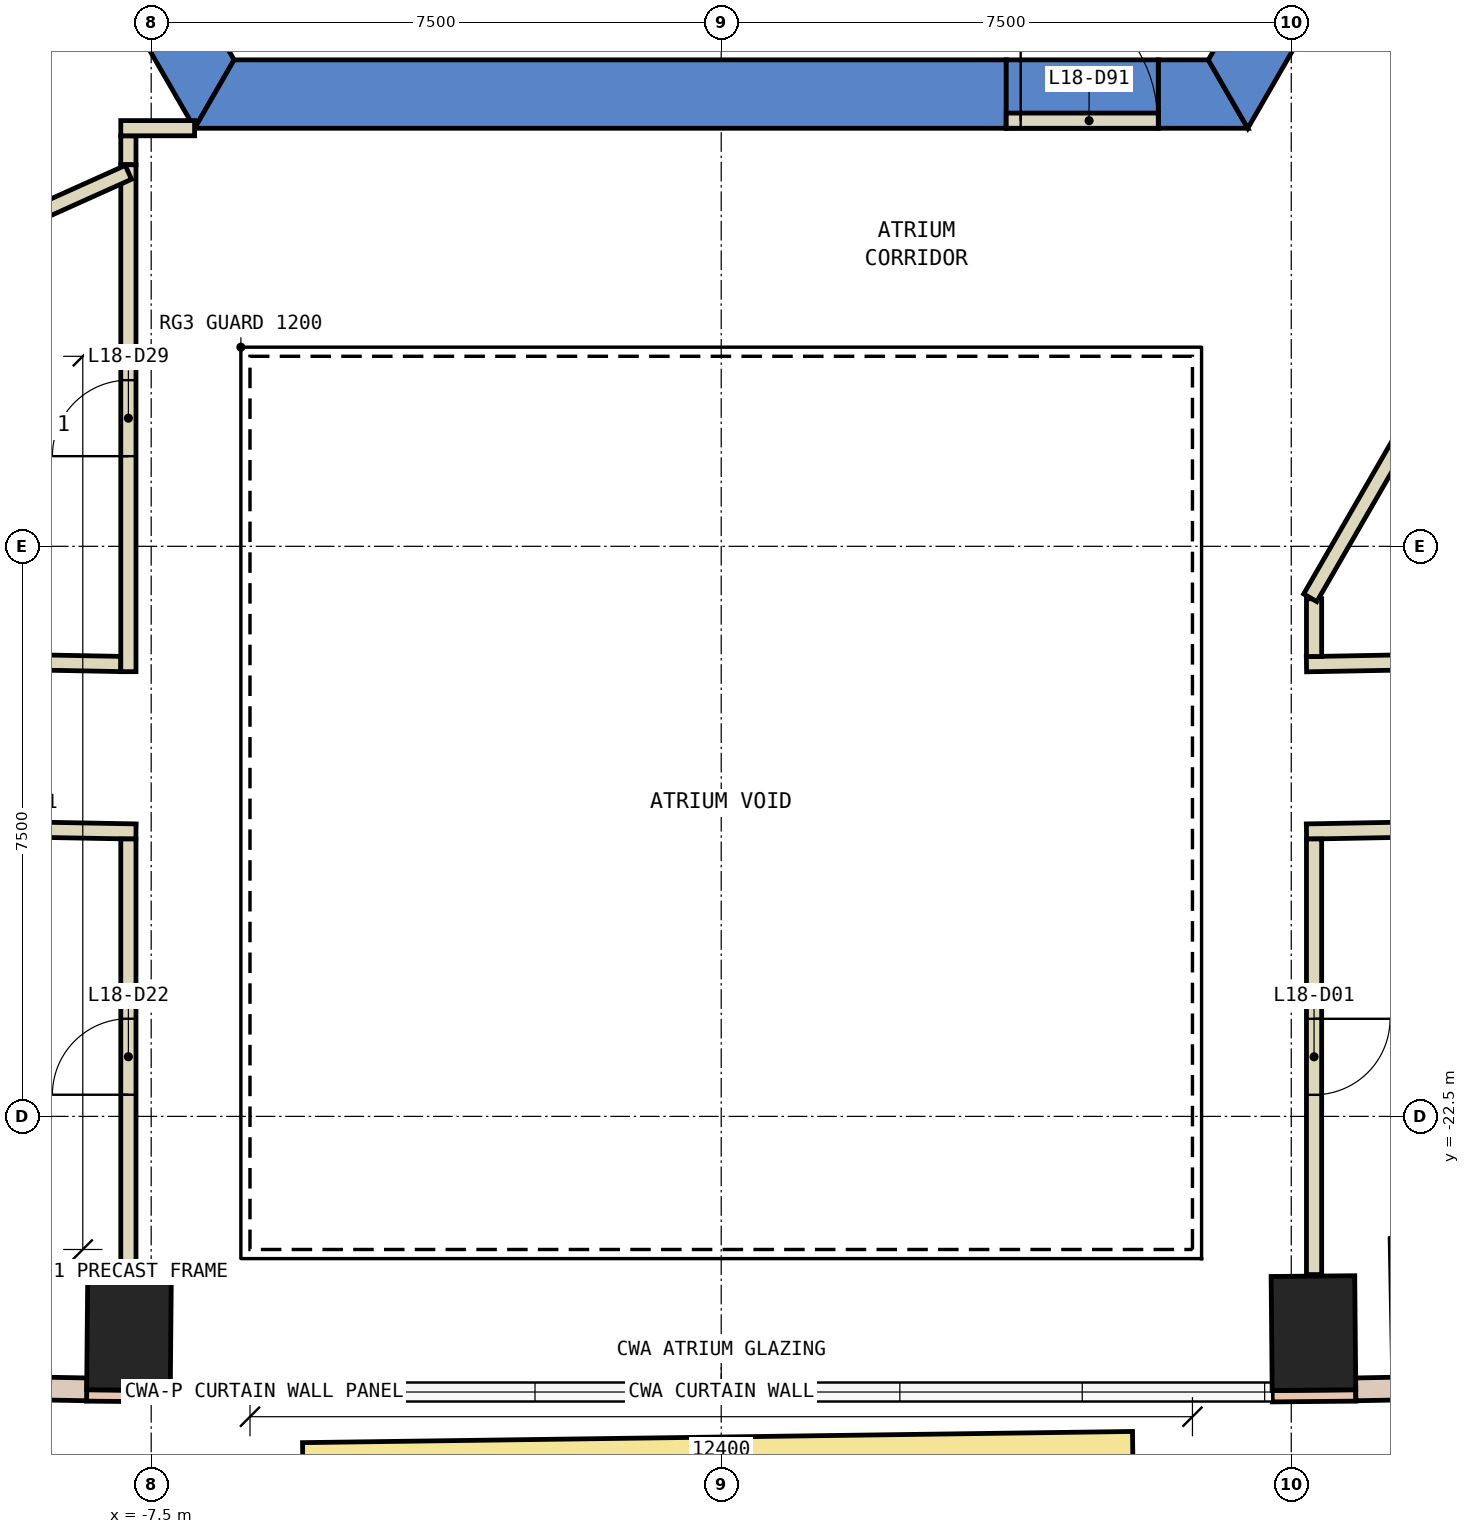
"""IFC4 building model, lengths in metres.
Left out: names, types, materials, properties, quantities, classifications, styles, units other than length and angle.
Written with IfcOpenShell. Run it as: python <this file> out.ifc"""

import sys

from ifc_helpers import new_model, si_unit, direction, frame, frame_2d, origin, origin_2d, place, context, subcontext, project, spatial, polyline, rectangle, outline, extrude, element, fill, save


model = new_model("IFC4")
c1 = context("Model", 3, precision=1e-05, world=origin(), true_north=direction((0.0, 1.0)))
c2 = subcontext(c1, "Body", "Model", "MODEL_VIEW")
j1 = project(units=[si_unit("LENGTHUNIT", "METRE"), si_unit("PLANEANGLEUNIT", "RADIAN")], contexts=[c1])
p1 = place(None, origin())
s1 = spatial("IfcSite", under=j1, at=p1, CompositionType="ELEMENT")
p2 = place(p1, origin())
s2 = spatial("IfcBuilding", under=s1, at=p2, CompositionType="ELEMENT")
p3 = place(p2, frame((0.0, 0.0, 86.6)))
s3 = spatial("IfcBuildingStorey", under=s2, at=p3, CompositionType="ELEMENT", Elevation=86.6)
for number, where, z_axis, x_axis in (
    (1, (-7.792, -25.351, 0.0), (0.0, 0.0, 1.0), (-1.0, 0.009, 0.0)),
    (2, (7.792, -25.351, 0.0), (0.0, 0.0, 1.0), (1.0, 0.009, 0.0)),
):
    element("IfcColumn", number, at=place(p3, frame(where, z_axis=z_axis, x_axis=x_axis)), inside=s3, PredefinedType="COLUMN", context=c2, shape_type="SweptSolid", body=[
        extrude(rectangle(XDim=1.1, YDim=1.5, at=origin_2d()), origin(), (0.0, 0.0, 1.0), 3.8),
    ])
p4 = place(p3, frame((0.0, 0.0, -0.6)))
e3 = element("IfcWall", 3, at=p4, inside=s3, PredefinedType="SHEAR", context=c2, shape_type="SweptSolid", body=[
    extrude(outline(polyline([(-13.856, 2.5), (-6.928, -9.5), (-6.409, -8.6), (-12.817, 2.5), (-13.856, 2.5)])), origin(), (0.0, 0.0, 1.0), 4.4),
])
p5 = place(p3, frame((0.0, 0.0, -0.6)))
e4 = element("IfcWall", 4, at=p5, inside=s3, PredefinedType="SHEAR", context=c2, shape_type="SweptSolid", body=[
    extrude(outline(polyline([(3.75, -9.5), (3.75, -8.6), (-6.409, -8.6), (-6.928, -9.5), (3.75, -9.5)])), origin(), (0.0, 0.0, 1.0), 4.4),
])
p6 = place(p3, frame((0.0, 0.0, -0.6)))
e5 = element("IfcWall", 5, at=p6, inside=s3, PredefinedType="SHEAR", context=c2, shape_type="SweptSolid", body=[
    extrude(outline(polyline([(5.75, -8.6), (5.75, -9.5), (6.928, -9.5), (6.409, -8.6), (5.75, -8.6)])), origin(), (0.0, 0.0, 1.0), 4.4),
])
p7 = place(p3, frame((0.0, 0.0, 3.6)))
e6 = element("IfcWall", 6, at=p7, inside=s3, PredefinedType="SHEAR", context=c2, shape_type="SweptSolid", body=[
    extrude(outline(polyline([(5.75, -9.5), (5.75, -8.6), (3.75, -8.6), (3.75, -9.5), (5.75, -9.5)])), origin(), (0.0, 0.0, 1.0), 0.2),
])
p8 = place(p3, frame((0.0, 0.0, -0.6)))
e7 = element("IfcWall", 7, at=p8, inside=s3, PredefinedType="SHEAR", context=c2, shape_type="SweptSolid", body=[
    extrude(outline(polyline([(8.117, -7.44), (7.338, -6.99), (6.409, -8.6), (6.928, -9.5), (8.117, -7.44)])), origin(), (0.0, 0.0, 1.0), 4.4),
])
for number, where, z_axis, x_axis in (
    (8, (-8.349, -26.171, 0.0), (0.0, 0.0, 1.0), (1.0, -0.009, 0.0)),
    (9, (7.249, -26.181, 0.0), (0.0, 0.0, 1.0), (1.0, 0.009, 0.0)),
):
    element("IfcWall", number, at=place(p3, frame(where, z_axis=z_axis, x_axis=x_axis)), inside=s3, PredefinedType="STANDARD", context=c2, shape_type="SweptSolid", body=[
        extrude(rectangle(XDim=1.1, YDim=0.15, at=frame_2d((0.55, 0.0))), origin(), (0.0, 0.0, 1.0), 3.8),
    ])
p9 = place(p3, frame((-14.242, -25.982, 0.0), z_axis=(0.0, 0.0, 1.0), x_axis=(0.999828633111, -0.018512277318, 0.0)))
e10 = element("IfcWall", 10, at=p9, inside=s3, PredefinedType="STANDARD", context=c2, shape_type="SweptSolid", body=[
    extrude(rectangle(XDim=5.895, YDim=0.3, at=frame_2d((2.948, 0.0))), origin(), (0.0, 0.0, 1.0), 3.8),
])
p10 = place(p9, frame((0.474, 0.0, 0.9)))
e11 = element("IfcOpeningElement", 11, at=p10, cuts=e10, PredefinedType="OPENING", context=c2, shape_type="SweptSolid", body=[
    extrude(rectangle(XDim=2.0, YDim=2.6, at=frame_2d((1.0, 1.3))), frame((0.0, 0.16, 0.0), z_axis=(0.0, -1.0, 0.0), x_axis=(1.0, 0.0, 0.0)), (0.0, 0.0, 1.0), 0.32),
])
p11 = place(p9, frame((3.421, 0.0, 0.9)))
e12 = element("IfcOpeningElement", 12, at=p11, cuts=e10, PredefinedType="OPENING", context=c2, shape_type="SweptSolid", body=[
    extrude(rectangle(XDim=2.0, YDim=2.6, at=frame_2d((1.0, 1.3))), frame((0.0, 0.16, 0.0), z_axis=(0.0, -1.0, 0.0), x_axis=(1.0, 0.0, 0.0)), (0.0, 0.0, 1.0), 0.32),
])
p12 = place(p3, frame((8.348, -26.091, 0.0), z_axis=(0.0, 0.0, 1.0), x_axis=(0.999828633111, 0.018512277318, 0.0)))
e13 = element("IfcWall", 13, at=p12, inside=s3, PredefinedType="STANDARD", context=c2, shape_type="SweptSolid", body=[
    extrude(rectangle(XDim=5.895, YDim=0.3, at=frame_2d((2.948, 0.0))), origin(), (0.0, 0.0, 1.0), 3.8),
])
p13 = place(p12, frame((0.474, 0.0, 0.0)))
e14 = element("IfcOpeningElement", 14, at=p13, cuts=e13, PredefinedType="OPENING", context=c2, shape_type="SweptSolid", body=[
    extrude(rectangle(XDim=2.0, YDim=2.4, at=frame_2d((1.0, 1.2))), frame((0.0, 0.16, 0.0), z_axis=(0.0, -1.0, 0.0), x_axis=(1.0, 0.0, 0.0)), (0.0, 0.0, 1.0), 0.32),
])
p14 = place(p12, frame((3.421, 0.0, 0.9)))
e15 = element("IfcOpeningElement", 15, at=p14, cuts=e13, PredefinedType="OPENING", context=c2, shape_type="SweptSolid", body=[
    extrude(rectangle(XDim=2.0, YDim=2.6, at=frame_2d((1.0, 1.3))), frame((0.0, 0.16, 0.0), z_axis=(0.0, -1.0, 0.0), x_axis=(1.0, 0.0, 0.0)), (0.0, 0.0, 1.0), 0.32),
])
p15 = place(p3, frame((-5.496, -27.742, 0.0), z_axis=(0.0, 0.0, 1.0), x_axis=(0.999909442252, 0.013457611041, 0.0)))
e16 = element("IfcWall", 16, at=p15, inside=s3, PredefinedType="STANDARD", context=c2, shape_type="SweptSolid", body=[
    extrude(rectangle(XDim=10.921, YDim=1.9, at=frame_2d((5.46, 0.0))), origin(), (0.0, 0.0, 1.0), 0.8),
])
p16 = place(p3, frame((7.7, -16.551, 0.0), z_axis=(0.0, 0.0, 1.0), x_axis=(0.999831478914, 0.018357934851, 0.0)))
e17 = element("IfcWall", 17, at=p16, inside=s3, PredefinedType="PARTITIONING", context=c2, shape_type="SweptSolid", body=[
    extrude(rectangle(XDim=6.862, YDim=0.2, at=frame_2d((3.431, 0.0))), origin(), (0.0, 0.0, 1.0), 3.8),
])
p17 = place(p3, frame((-10.408, -16.501, 0.0), z_axis=(0.0, 0.0, 1.0), x_axis=(0.999823568917, -0.018783797216, 0.0)))
e18 = element("IfcWall", 18, at=p17, inside=s3, PredefinedType="PARTITIONING", context=c2, shape_type="SweptSolid", body=[
    extrude(rectangle(XDim=2.509, YDim=0.2, at=frame_2d((1.254, 0.0))), origin(), (0.0, 0.0, 1.0), 3.8),
])
p18 = place(p3, frame((14.689, -18.623, 0.0), z_axis=(0.0, 0.0, 1.0), x_axis=(-0.99982995049, -0.01844098976, 0.0)))
e19 = element("IfcWall", 19, at=p18, inside=s3, PredefinedType="PARTITIONING", context=c2, shape_type="SweptSolid", body=[
    extrude(rectangle(XDim=6.99, YDim=0.2, at=frame_2d((3.495, 0.0))), origin(), (0.0, 0.0, 1.0), 3.8),
])
p19 = place(p3, frame((-7.7, -18.752, 0.0), z_axis=(0.0, 0.0, 1.0), x_axis=(-0.999830394604, 0.018416895142, 0.0)))
e20 = element("IfcWall", 20, at=p19, inside=s3, PredefinedType="PARTITIONING", context=c2, shape_type="SweptSolid", body=[
    extrude(rectangle(XDim=6.84, YDim=0.2, at=frame_2d((3.42, 0.0))), origin(), (0.0, 0.0, 1.0), 3.8),
])
p20 = place(p3, frame((7.8, -15.69, 0.0), z_axis=(0.0, 0.0, 1.0), x_axis=(0.0, -1.0, 0.0)))
e21 = element("IfcWall", 21, at=p20, inside=s3, PredefinedType="PARTITIONING", context=c2, shape_type="SweptSolid", body=[
    extrude(rectangle(XDim=0.759, YDim=0.2, at=frame_2d((0.379, 0.0))), origin(), (0.0, 0.0, 1.0), 3.8),
])
p21 = place(p3, frame((-7.8, -9.98, 0.0), z_axis=(0.0, 0.0, 1.0), x_axis=(0.0, 1.0, 0.0)))
e22 = element("IfcWall", 22, at=p21, inside=s3, PredefinedType="PARTITIONING", context=c2, shape_type="SweptSolid", body=[
    extrude(rectangle(XDim=0.381, YDim=0.2, at=frame_2d((0.19, 0.0))), origin(), (0.0, 0.0, 1.0), 3.8),
])
p22 = place(p3, frame((-7.9, -9.499, 0.0), z_axis=(0.0, 0.0, 1.0), x_axis=(1.0, 0.0, 0.0)))
e23 = element("IfcWall", 23, at=p22, inside=s3, PredefinedType="PARTITIONING", context=c2, shape_type="SweptSolid", body=[
    extrude(rectangle(XDim=0.971, YDim=0.2, at=frame_2d((0.485, 0.0))), origin(), (0.0, 0.0, 1.0), 3.8),
])
p23 = place(p3, frame((-7.8, -16.649, 0.0), z_axis=(0.0, 0.0, 1.0), x_axis=(0.0, 1.0, 0.0)))
e24 = element("IfcWall", 24, at=p23, inside=s3, PredefinedType="PARTITIONING", context=c2, shape_type="SweptSolid", body=[
    extrude(rectangle(XDim=6.669, YDim=0.2, at=frame_2d((3.334, 0.0))), origin(), (0.0, 0.0, 1.0), 3.8),
])
p24 = place(p23, frame((2.835, 0.0, 0.0)))
e25 = element("IfcOpeningElement", 25, at=p24, cuts=e24, PredefinedType="OPENING", context=c2, shape_type="SweptSolid", body=[
    extrude(rectangle(XDim=1.0, YDim=2.1, at=frame_2d((0.5, 1.05))), frame((0.0, 0.11, 0.0), z_axis=(0.0, -1.0, 0.0), x_axis=(1.0, 0.0, 0.0)), (0.0, 0.0, 1.0), 0.22),
])
p25 = place(p3, frame((7.8, -18.85, 0.0), z_axis=(0.0, 0.0, 1.0), x_axis=(0.0, -1.0, 0.0)))
e26 = element("IfcWall", 26, at=p25, inside=s3, PredefinedType="PARTITIONING", context=c2, shape_type="SweptSolid", body=[
    extrude(rectangle(XDim=5.731, YDim=0.2, at=frame_2d((2.865, 0.0))), origin(), (0.0, 0.0, 1.0), 3.8),
])
p26 = place(p25, frame((2.366, 0.0, 0.0)))
e27 = element("IfcOpeningElement", 27, at=p26, cuts=e26, PredefinedType="OPENING", context=c2, shape_type="SweptSolid", body=[
    extrude(rectangle(XDim=1.0, YDim=2.1, at=frame_2d((0.5, 1.05))), frame((0.0, 0.11, 0.0), z_axis=(0.0, -1.0, 0.0), x_axis=(1.0, 0.0, 0.0)), (0.0, 0.0, 1.0), 0.22),
])
p27 = place(p3, frame((-7.8, -24.581, 0.0), z_axis=(0.0, 0.0, 1.0), x_axis=(0.0, 1.0, 0.0)))
e28 = element("IfcWall", 28, at=p27, inside=s3, PredefinedType="PARTITIONING", context=c2, shape_type="SweptSolid", body=[
    extrude(rectangle(XDim=5.731, YDim=0.2, at=frame_2d((2.865, 0.0))), origin(), (0.0, 0.0, 1.0), 3.8),
])
p28 = place(p27, frame((2.366, 0.0, 0.0)))
e29 = element("IfcOpeningElement", 29, at=p28, cuts=e28, PredefinedType="OPENING", context=c2, shape_type="SweptSolid", body=[
    extrude(rectangle(XDim=1.0, YDim=2.1, at=frame_2d((0.5, 1.05))), frame((0.0, 0.11, 0.0), z_axis=(0.0, -1.0, 0.0), x_axis=(1.0, 0.0, 0.0)), (0.0, 0.0, 1.0), 0.22),
])
p29 = place(p3, frame((-7.8, -10.08, 0.0), z_axis=(0.0, 0.0, 1.0), x_axis=(-0.911938383636, -0.410327167577, 0.0)))
e30 = element("IfcWall", 30, at=p29, inside=s3, PredefinedType="PARTITIONING", context=c2, shape_type="SweptSolid", body=[
    extrude(rectangle(XDim=5.683, YDim=0.2, at=frame_2d((2.842, 0.0))), origin(), (0.0, 0.0, 1.0), 3.8),
])
p30 = place(p3, frame((3.75, -9.4, 0.0), z_axis=(0.0, 0.0, 1.0), x_axis=(1.0, 0.0, 0.0)))
e31 = element("IfcWall", 31, at=p30, inside=s3, PredefinedType="PARTITIONING", context=c2, shape_type="SweptSolid", body=[
    extrude(rectangle(XDim=2.0, YDim=0.2, at=frame_2d((1.0, 0.0))), origin(), (0.0, 0.0, 1.0), 2.4),
])
p31 = place(p30, frame((0.19, 0.0, 0.0)))
e32 = element("IfcOpeningElement", 32, at=p31, cuts=e31, PredefinedType="OPENING", context=c2, shape_type="SweptSolid", body=[
    extrude(rectangle(XDim=1.8, YDim=2.1, at=frame_2d((0.9, 1.05))), frame((0.0, 0.11, 0.0), z_axis=(0.0, -1.0, 0.0), x_axis=(1.0, 0.0, 0.0)), (0.0, 0.0, 1.0), 0.22),
])
p32 = place(p3, frame((12.401, -7.621, 0.0), z_axis=(0.0, 0.0, 1.0), x_axis=(-0.499983724212, -0.866034800411, 0.0)))
e33 = element("IfcWall", 33, at=p32, inside=s3, PredefinedType="PARTITIONING", context=c2, shape_type="SweptSolid", body=[
    extrude(rectangle(XDim=9.302, YDim=0.2, at=frame_2d((4.651, 0.0))), origin(), (0.0, 0.0, 1.0), 3.8),
])
p33 = place(p26, origin())
e34 = element("IfcDoor", 34, at=p33, inside=s3, OperationType="SINGLE_SWING_LEFT", PredefinedType="DOOR", context=c2, shape_type="SweptSolid", body=[
    extrude(rectangle(XDim=1.0, YDim=2.1, at=frame_2d((0.5, 1.05))), frame((0.0, 0.025, 0.0), z_axis=(0.0, -1.0, 0.0), x_axis=(1.0, 0.0, 0.0)), (0.0, 0.0, 1.0), 0.05),
])
fill(e27, e34)
p34 = place(p28, origin())
e35 = element("IfcDoor", 35, at=p34, inside=s3, OperationType="SINGLE_SWING_LEFT", PredefinedType="DOOR", context=c2, shape_type="SweptSolid", body=[
    extrude(rectangle(XDim=1.0, YDim=2.1, at=frame_2d((0.5, 1.05))), frame((0.0, 0.025, 0.0), z_axis=(0.0, -1.0, 0.0), x_axis=(1.0, 0.0, 0.0)), (0.0, 0.0, 1.0), 0.05),
])
fill(e29, e35)
p35 = place(p24, origin())
e36 = element("IfcDoor", 36, at=p35, inside=s3, OperationType="SINGLE_SWING_LEFT", PredefinedType="DOOR", context=c2, shape_type="SweptSolid", body=[
    extrude(rectangle(XDim=1.0, YDim=2.1, at=frame_2d((0.5, 1.05))), frame((0.0, 0.025, 0.0), z_axis=(0.0, -1.0, 0.0), x_axis=(1.0, 0.0, 0.0)), (0.0, 0.0, 1.0), 0.05),
])
fill(e25, e36)
p36 = place(p31, origin())
e37 = element("IfcDoor", 37, at=p36, inside=s3, OperationType="DOUBLE_DOOR_SINGLE_SWING", PredefinedType="DOOR", context=c2, shape_type="SweptSolid", body=[
    extrude(rectangle(XDim=1.8, YDim=2.1, at=frame_2d((0.9, 1.05))), frame((0.0, 0.025, 0.0), z_axis=(0.0, -1.0, 0.0), x_axis=(1.0, 0.0, 0.0)), (0.0, 0.0, 1.0), 0.05),
])
fill(e32, e37)
save(model, sys.argv[1])
